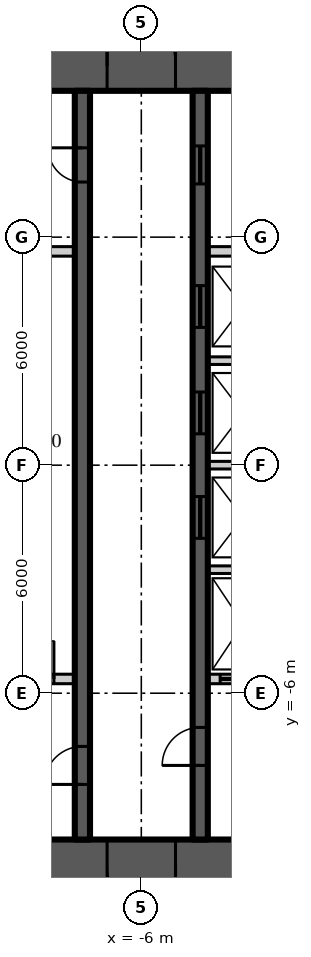
"""IFC4 building model, lengths in metres.
Left out: names, types, materials, properties, quantities, classifications, styles, units other than length and angle.
Written with IfcOpenShell. Run it as: python <this file> out.ifc"""

import sys

from ifc_helpers import new_model, si_unit, direction, frame, frame_2d, origin, place, context, subcontext, project, spatial, rectangle, extrude, element, fill, save


model = new_model("IFC4")
c1 = context("Model", 3, precision=1e-05, world=origin(), true_north=direction((0.0, 1.0)))
c2 = subcontext(c1, "Body", "Model", "MODEL_VIEW")
j1 = project(units=[si_unit("LENGTHUNIT", "METRE"), si_unit("PLANEANGLEUNIT", "RADIAN")], contexts=[c1])
p1 = place(None, origin())
s1 = spatial("IfcSite", under=j1, at=p1, CompositionType="ELEMENT")
p2 = place(p1, origin())
s2 = spatial("IfcBuilding", under=s1, at=p2, CompositionType="ELEMENT")
p3 = place(p2, frame((0.0, 0.0, 147.6)))
s3 = spatial("IfcBuildingStorey", under=s2, at=p3, CompositionType="ELEMENT", Elevation=147.6)
p4 = place(p3, frame((-11.15, 10.5, 0.0), z_axis=(0.0, 0.0, 1.0), x_axis=(1.0, 0.0, 0.0)))
e1 = element("IfcWall", 1, at=p4, inside=s3, PredefinedType="SHEAR", context=c2, shape_type="SweptSolid", body=[
    extrude(rectangle(XDim=22.3, YDim=1.3, at=frame_2d((11.15, 0.0))), origin(), (0.0, 0.0, 1.0), 3.9),
])
p5 = place(p4, frame((4.25, 0.0, 0.0)))
e2 = element("IfcOpeningElement", 2, at=p5, cuts=e1, PredefinedType="OPENING", context=c2, shape_type="SweptSolid", body=[
    extrude(rectangle(XDim=1.8, YDim=2.2, at=frame_2d((0.9, 1.1))), frame((0.0, 0.66, 0.0), z_axis=(0.0, -1.0, 0.0), x_axis=(1.0, 0.0, 0.0)), (0.0, 0.0, 1.0), 1.32),
])
p6 = place(p4, frame((16.25, 0.0, 0.0)))
e3 = element("IfcOpeningElement", 3, at=p6, cuts=e1, PredefinedType="OPENING", context=c2, shape_type="SweptSolid", body=[
    extrude(rectangle(XDim=1.8, YDim=2.2, at=frame_2d((0.9, 1.1))), frame((0.0, 0.66, 0.0), z_axis=(0.0, -1.0, 0.0), x_axis=(1.0, 0.0, 0.0)), (0.0, 0.0, 1.0), 1.32),
])
p7 = place(p3, frame((11.15, -10.5, 0.0), z_axis=(0.0, 0.0, 1.0), x_axis=(-1.0, 0.0, 0.0)))
e4 = element("IfcWall", 4, at=p7, inside=s3, PredefinedType="SHEAR", context=c2, shape_type="SweptSolid", body=[
    extrude(rectangle(XDim=22.3, YDim=1.3, at=frame_2d((11.15, 0.0))), origin(), (0.0, 0.0, 1.0), 3.9),
])
p8 = place(p7, frame((16.25, 0.0, 0.0)))
e5 = element("IfcOpeningElement", 5, at=p8, cuts=e4, PredefinedType="OPENING", context=c2, shape_type="SweptSolid", body=[
    extrude(rectangle(XDim=1.8, YDim=2.2, at=frame_2d((0.9, 1.1))), frame((0.0, 0.66, 0.0), z_axis=(0.0, -1.0, 0.0), x_axis=(1.0, 0.0, 0.0)), (0.0, 0.0, 1.0), 1.32),
])
p9 = place(p7, frame((4.25, 0.0, 0.0)))
e6 = element("IfcOpeningElement", 6, at=p9, cuts=e4, PredefinedType="OPENING", context=c2, shape_type="SweptSolid", body=[
    extrude(rectangle(XDim=1.8, YDim=2.2, at=frame_2d((0.9, 1.1))), frame((0.0, 0.66, 0.0), z_axis=(0.0, -1.0, 0.0), x_axis=(1.0, 0.0, 0.0)), (0.0, 0.0, 1.0), 1.32),
])
p10 = place(p3, frame((-7.55, -9.85, 0.0), z_axis=(0.0, 0.0, 1.0), x_axis=(0.0, 1.0, 0.0)))
e7 = element("IfcWall", 7, at=p10, inside=s3, PredefinedType="SHEAR", context=c2, shape_type="SweptSolid", body=[
    extrude(rectangle(XDim=19.7, YDim=0.4, at=frame_2d((9.85, 0.0))), origin(), (0.0, 0.0, 1.0), 3.9),
])
p11 = place(p10, frame((1.45, 0.0, 0.0)))
e8 = element("IfcOpeningElement", 8, at=p11, cuts=e7, PredefinedType="OPENING", context=c2, shape_type="SweptSolid", body=[
    extrude(rectangle(XDim=1.0, YDim=2.2, at=frame_2d((0.5, 1.1))), frame((0.0, 0.21, 0.0), z_axis=(0.0, -1.0, 0.0), x_axis=(1.0, 0.0, 0.0)), (0.0, 0.0, 1.0), 0.42),
])
p12 = place(p10, frame((17.3, 0.0, 0.0)))
e9 = element("IfcOpeningElement", 9, at=p12, cuts=e7, PredefinedType="OPENING", context=c2, shape_type="SweptSolid", body=[
    extrude(rectangle(XDim=0.9, YDim=2.1, at=frame_2d((0.45, 1.05))), frame((0.0, 0.21, 0.0), z_axis=(0.0, -1.0, 0.0), x_axis=(1.0, 0.0, 0.0)), (0.0, 0.0, 1.0), 0.42),
])
p13 = place(p3, frame((-4.45, -9.85, 0.0), z_axis=(0.0, 0.0, 1.0), x_axis=(0.0, 1.0, 0.0)))
e10 = element("IfcWall", 10, at=p13, inside=s3, PredefinedType="SHEAR", context=c2, shape_type="SweptSolid", body=[
    extrude(rectangle(XDim=19.7, YDim=0.4, at=frame_2d((9.85, 0.0))), origin(), (0.0, 0.0, 1.0), 3.9),
])
p14 = place(p13, frame((1.95, 0.0, 0.0)))
e11 = element("IfcOpeningElement", 11, at=p14, cuts=e10, PredefinedType="OPENING", context=c2, shape_type="SweptSolid", body=[
    extrude(rectangle(XDim=1.0, YDim=2.2, at=frame_2d((0.5, 1.1))), frame((0.0, 0.21, 0.0), z_axis=(0.0, -1.0, 0.0), x_axis=(1.0, 0.0, 0.0)), (0.0, 0.0, 1.0), 0.42),
])
p15 = place(p13, frame((17.25, 0.0, 0.0)))
e12 = element("IfcOpeningElement", 12, at=p15, cuts=e10, PredefinedType="OPENING", context=c2, shape_type="SweptSolid", body=[
    extrude(rectangle(XDim=1.0, YDim=2.1, at=frame_2d((0.5, 1.05))), frame((0.0, 0.21, 0.0), z_axis=(0.0, -1.0, 0.0), x_axis=(1.0, 0.0, 0.0)), (0.0, 0.0, 1.0), 0.42),
])
p16 = place(p13, frame((7.925, 0.0, 0.0)))
e13 = element("IfcOpeningElement", 13, at=p16, cuts=e10, PredefinedType="OPENING", context=c2, shape_type="SweptSolid", body=[
    extrude(rectangle(XDim=1.1, YDim=2.2, at=frame_2d((0.55, 1.1))), frame((0.0, 0.21, 0.0), z_axis=(0.0, -1.0, 0.0), x_axis=(1.0, 0.0, 0.0)), (0.0, 0.0, 1.0), 0.42),
])
p17 = place(p13, frame((10.675, 0.0, 0.0)))
e14 = element("IfcOpeningElement", 14, at=p17, cuts=e10, PredefinedType="OPENING", context=c2, shape_type="SweptSolid", body=[
    extrude(rectangle(XDim=1.1, YDim=2.2, at=frame_2d((0.55, 1.1))), frame((0.0, 0.21, 0.0), z_axis=(0.0, -1.0, 0.0), x_axis=(1.0, 0.0, 0.0)), (0.0, 0.0, 1.0), 0.42),
])
p18 = place(p13, frame((13.475, 0.0, 0.0)))
e15 = element("IfcOpeningElement", 15, at=p18, cuts=e10, PredefinedType="OPENING", context=c2, shape_type="SweptSolid", body=[
    extrude(rectangle(XDim=1.1, YDim=2.2, at=frame_2d((0.55, 1.1))), frame((0.0, 0.21, 0.0), z_axis=(0.0, -1.0, 0.0), x_axis=(1.0, 0.0, 0.0)), (0.0, 0.0, 1.0), 0.42),
])
p19 = place(p3, frame((-9.85, 5.625, 0.0), z_axis=(0.0, 0.0, 1.0), x_axis=(1.0, 0.0, 0.0)))
e16 = element("IfcWall", 16, at=p19, inside=s3, PredefinedType="SOLIDWALL", context=c2, shape_type="SweptSolid", body=[
    extrude(rectangle(XDim=2.1, YDim=0.25, at=frame_2d((1.05, 0.0))), origin(), (0.0, 0.0, 1.0), 3.7),
])
p20 = place(p3, frame((-4.25, 5.625, 0.0), z_axis=(0.0, 0.0, 1.0), x_axis=(1.0, 0.0, 0.0)))
e17 = element("IfcWall", 17, at=p20, inside=s3, PredefinedType="SOLIDWALL", context=c2, shape_type="SweptSolid", body=[
    extrude(rectangle(XDim=1.85, YDim=0.25, at=frame_2d((0.925, 0.0))), origin(), (0.0, 0.0, 1.0), 3.7),
])
p21 = place(p3, frame((-9.85, -5.625, 0.0), z_axis=(0.0, 0.0, 1.0), x_axis=(1.0, 0.0, 0.0)))
e18 = element("IfcWall", 18, at=p21, inside=s3, PredefinedType="SOLIDWALL", context=c2, shape_type="SweptSolid", body=[
    extrude(rectangle(XDim=2.1, YDim=0.25, at=frame_2d((1.05, 0.0))), origin(), (0.0, 0.0, 1.0), 3.7),
])
p22 = place(p21, frame((0.55, 0.0, 0.0)))
e19 = element("IfcOpeningElement", 19, at=p22, cuts=e18, PredefinedType="OPENING", context=c2, shape_type="SweptSolid", body=[
    extrude(rectangle(XDim=1.0, YDim=2.2, at=frame_2d((0.5, 1.1))), frame((0.0, 0.135, 0.0), z_axis=(0.0, -1.0, 0.0), x_axis=(1.0, 0.0, 0.0)), (0.0, 0.0, 1.0), 0.27),
])
p23 = place(p3, frame((-4.25, -5.625, 0.0), z_axis=(0.0, 0.0, 1.0), x_axis=(1.0, 0.0, 0.0)))
e20 = element("IfcWall", 20, at=p23, inside=s3, PredefinedType="SOLIDWALL", context=c2, shape_type="SweptSolid", body=[
    extrude(rectangle(XDim=1.85, YDim=0.25, at=frame_2d((0.925, 0.0))), origin(), (0.0, 0.0, 1.0), 3.7),
])
p24 = place(p23, frame((0.325, 0.0, 0.0)))
e21 = element("IfcOpeningElement", 21, at=p24, cuts=e20, PredefinedType="OPENING", context=c2, shape_type="SweptSolid", body=[
    extrude(rectangle(XDim=1.2, YDim=2.2, at=frame_2d((0.6, 1.1))), frame((0.0, 0.135, 0.0), z_axis=(0.0, -1.0, 0.0), x_axis=(1.0, 0.0, 0.0)), (0.0, 0.0, 1.0), 0.27),
])
for number, where, z_axis, x_axis in (
    (22, (-4.25, -2.75, 0.0), (0.0, 0.0, 1.0), (1.0, 0.0, 0.0)),
    (23, (-4.25, 0.0, 0.0), (0.0, 0.0, 1.0), (1.0, 0.0, 0.0)),
    (24, (-4.25, 2.75, 0.0), (0.0, 0.0, 1.0), (1.0, 0.0, 0.0)),
):
    element("IfcWall", number, at=place(p3, frame(where, z_axis=z_axis, x_axis=x_axis)), inside=s3, PredefinedType="SOLIDWALL", context=c2, shape_type="SweptSolid", body=[
        extrude(rectangle(XDim=1.85, YDim=0.2, at=frame_2d((0.925, 0.0))), origin(), (0.0, 0.0, 1.0), 3.7),
    ])
p25 = place(p5, origin())
e25 = element("IfcDoor", 25, at=p25, inside=s3, OperationType="DOUBLE_DOOR_DOUBLE_SWING", PredefinedType="DOOR", context=c2, shape_type="SweptSolid", body=[
    extrude(rectangle(XDim=1.8, YDim=2.2, at=frame_2d((0.9, 1.1))), frame((0.0, 0.025, 0.0), z_axis=(0.0, -1.0, 0.0), x_axis=(1.0, 0.0, 0.0)), (0.0, 0.0, 1.0), 0.05),
])
fill(e2, e25)
p26 = place(p8, origin())
e26 = element("IfcDoor", 26, at=p26, inside=s3, OperationType="DOUBLE_DOOR_DOUBLE_SWING", PredefinedType="DOOR", context=c2, shape_type="SweptSolid", body=[
    extrude(rectangle(XDim=1.8, YDim=2.2, at=frame_2d((0.9, 1.1))), frame((0.0, 0.025, 0.0), z_axis=(0.0, -1.0, 0.0), x_axis=(1.0, 0.0, 0.0)), (0.0, 0.0, 1.0), 0.05),
])
fill(e5, e26)
p27 = place(p11, origin())
e27 = element("IfcDoor", 27, at=p27, inside=s3, OperationType="SINGLE_SWING_LEFT", PredefinedType="DOOR", context=c2, shape_type="SweptSolid", body=[
    extrude(rectangle(XDim=1.0, YDim=2.2, at=frame_2d((0.5, 1.1))), frame((0.0, 0.025, 0.0), z_axis=(0.0, -1.0, 0.0), x_axis=(1.0, 0.0, 0.0)), (0.0, 0.0, 1.0), 0.05),
])
fill(e8, e27)
p28 = place(p14, origin())
e28 = element("IfcDoor", 28, at=p28, inside=s3, OperationType="SINGLE_SWING_LEFT", PredefinedType="DOOR", context=c2, shape_type="SweptSolid", body=[
    extrude(rectangle(XDim=1.0, YDim=2.2, at=frame_2d((0.5, 1.1))), frame((0.0, 0.025, 0.0), z_axis=(0.0, -1.0, 0.0), x_axis=(1.0, 0.0, 0.0)), (0.0, 0.0, 1.0), 0.05),
])
fill(e11, e28)
p29 = place(p12, origin())
e29 = element("IfcDoor", 29, at=p29, inside=s3, OperationType="SINGLE_SWING_RIGHT", PredefinedType="DOOR", context=c2, shape_type="SweptSolid", body=[
    extrude(rectangle(XDim=0.9, YDim=2.1, at=frame_2d((0.45, 1.05))), frame((0.0, 0.025, 0.0), z_axis=(0.0, -1.0, 0.0), x_axis=(1.0, 0.0, 0.0)), (0.0, 0.0, 1.0), 0.05),
])
fill(e9, e29)
p30 = place(p15, origin())
e30 = element("IfcDoor", 30, at=p30, inside=s3, OperationType="SLIDING_TO_LEFT", PredefinedType="DOOR", context=c2, shape_type="SweptSolid", body=[
    extrude(rectangle(XDim=1.0, YDim=2.1, at=frame_2d((0.5, 1.05))), frame((0.0, 0.025, 0.0), z_axis=(0.0, -1.0, 0.0), x_axis=(1.0, 0.0, 0.0)), (0.0, 0.0, 1.0), 0.05),
])
fill(e12, e30)
p31 = place(p16, origin())
e31 = element("IfcDoor", 31, at=p31, inside=s3, OperationType="SLIDING_TO_LEFT", PredefinedType="DOOR", context=c2, shape_type="SweptSolid", body=[
    extrude(rectangle(XDim=1.1, YDim=2.2, at=frame_2d((0.55, 1.1))), frame((0.0, 0.025, 0.0), z_axis=(0.0, -1.0, 0.0), x_axis=(1.0, 0.0, 0.0)), (0.0, 0.0, 1.0), 0.05),
])
fill(e13, e31)
p32 = place(p17, origin())
e32 = element("IfcDoor", 32, at=p32, inside=s3, OperationType="SLIDING_TO_LEFT", PredefinedType="DOOR", context=c2, shape_type="SweptSolid", body=[
    extrude(rectangle(XDim=1.1, YDim=2.2, at=frame_2d((0.55, 1.1))), frame((0.0, 0.025, 0.0), z_axis=(0.0, -1.0, 0.0), x_axis=(1.0, 0.0, 0.0)), (0.0, 0.0, 1.0), 0.05),
])
fill(e14, e32)
p33 = place(p18, origin())
e33 = element("IfcDoor", 33, at=p33, inside=s3, OperationType="SLIDING_TO_LEFT", PredefinedType="DOOR", context=c2, shape_type="SweptSolid", body=[
    extrude(rectangle(XDim=1.1, YDim=2.2, at=frame_2d((0.55, 1.1))), frame((0.0, 0.025, 0.0), z_axis=(0.0, -1.0, 0.0), x_axis=(1.0, 0.0, 0.0)), (0.0, 0.0, 1.0), 0.05),
])
fill(e15, e33)
p34 = place(p24, origin())
e34 = element("IfcDoor", 34, at=p34, inside=s3, OperationType="SLIDING_TO_LEFT", PredefinedType="DOOR", context=c2, shape_type="SweptSolid", body=[
    extrude(rectangle(XDim=1.2, YDim=2.2, at=frame_2d((0.6, 1.1))), frame((0.0, 0.025, 0.0), z_axis=(0.0, -1.0, 0.0), x_axis=(1.0, 0.0, 0.0)), (0.0, 0.0, 1.0), 0.05),
])
fill(e21, e34)
p35 = place(p22, origin())
e35 = element("IfcDoor", 35, at=p35, inside=s3, OperationType="SINGLE_SWING_RIGHT", PredefinedType="DOOR", context=c2, shape_type="SweptSolid", body=[
    extrude(rectangle(XDim=1.0, YDim=2.2, at=frame_2d((0.5, 1.1))), frame((0.0, 0.025, 0.0), z_axis=(0.0, -1.0, 0.0), x_axis=(1.0, 0.0, 0.0)), (0.0, 0.0, 1.0), 0.05),
])
fill(e19, e35)
save(model, sys.argv[1])
